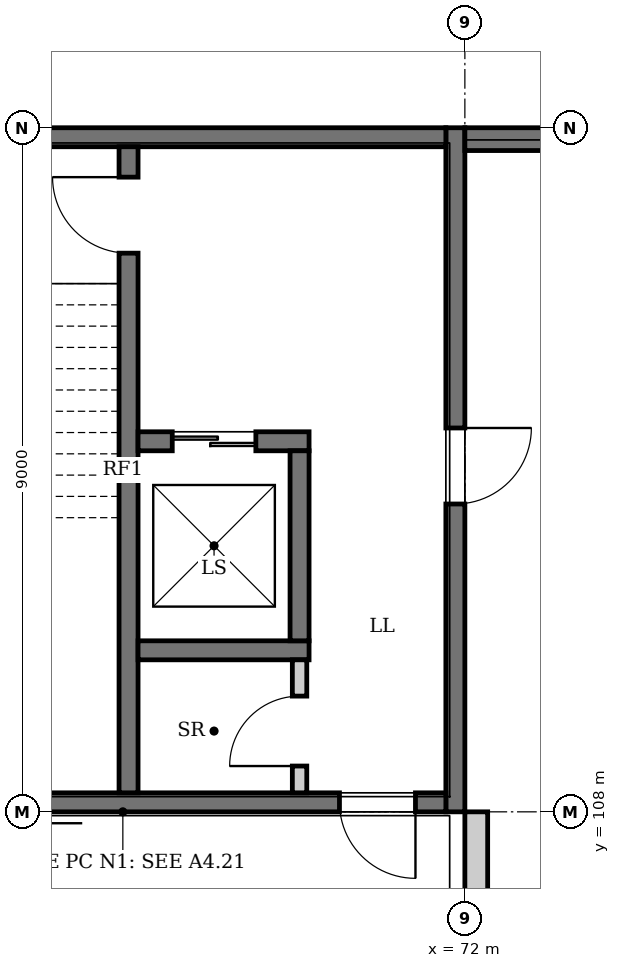
"""IFC4 building model, lengths in metres.
Left out: names, types, materials, properties, quantities, classifications, styles, units other than length and angle.
Written with IfcOpenShell. Run it as: python <this file> out.ifc"""

import sys

from ifc_helpers import new_model, si_unit, direction, frame, frame_2d, origin, place, context, subcontext, project, spatial, rectangle, extrude, element, fill, save


model = new_model("IFC4")
c1 = context("Model", 3, precision=1e-05, world=origin(), true_north=direction((0.0, 1.0)))
c2 = subcontext(c1, "Body", "Model", "MODEL_VIEW")
j1 = project(units=[si_unit("LENGTHUNIT", "METRE"), si_unit("PLANEANGLEUNIT", "RADIAN")], contexts=[c1])
p1 = place(None, origin())
s1 = spatial("IfcSite", under=j1, at=p1, CompositionType="ELEMENT")
p2 = place(p1, origin())
s2 = spatial("IfcBuilding", under=s1, at=p2, CompositionType="ELEMENT")
p3 = place(p2, frame((0.0, 0.0, 15.0)))
s3 = spatial("IfcBuildingStorey", under=s2, at=p3, CompositionType="ELEMENT", Elevation=15.0)
p4 = place(p3, frame((71.875, 108.0, 0.0), z_axis=(0.0, 0.0, 1.0), x_axis=(0.0, 1.0, 0.0)))
e1 = element("IfcWall", 1, at=p4, inside=s3, PredefinedType="SHEAR", context=c2, shape_type="SweptSolid", body=[
    extrude(rectangle(XDim=9.0, YDim=0.25, at=frame_2d((4.5, 0.0))), origin(), (0.0, 0.0, 1.0), 4.05),
])
p5 = place(p4, frame((4.05, 0.0, 0.0)))
e2 = element("IfcOpeningElement", 2, at=p5, cuts=e1, PredefinedType="OPENING", context=c2, shape_type="SweptSolid", body=[
    extrude(rectangle(XDim=1.0, YDim=2.1, at=frame_2d((0.5, 1.05))), frame((0.0, 0.135, 0.0), z_axis=(0.0, -1.0, 0.0), x_axis=(1.0, 0.0, 0.0)), (0.0, 0.0, 1.0), 0.27),
])
p6 = place(p3, frame((63.25, 108.125, 0.0), z_axis=(0.0, 0.0, 1.0), x_axis=(1.0, 0.0, 0.0)))
e3 = element("IfcWall", 3, at=p6, inside=s3, PredefinedType="SHEAR", context=c2, shape_type="SweptSolid", body=[
    extrude(rectangle(XDim=8.5, YDim=0.25, at=frame_2d((4.25, 0.0))), origin(), (0.0, 0.0, 1.0), 4.05),
])
p7 = place(p6, frame((7.1, 0.0, 0.0)))
e4 = element("IfcOpeningElement", 4, at=p7, cuts=e3, PredefinedType="OPENING", context=c2, shape_type="SweptSolid", body=[
    extrude(rectangle(XDim=1.0, YDim=2.1, at=frame_2d((0.5, 1.05))), frame((0.0, 0.135, 0.0), z_axis=(0.0, -1.0, 0.0), x_axis=(1.0, 0.0, 0.0)), (0.0, 0.0, 1.0), 0.27),
])
p8 = place(p3, frame((63.25, 116.875, 0.0), z_axis=(0.0, 0.0, 1.0), x_axis=(1.0, 0.0, 0.0)))
e5 = element("IfcWall", 5, at=p8, inside=s3, PredefinedType="SHEAR", context=c2, shape_type="SweptSolid", body=[
    extrude(rectangle(XDim=8.5, YDim=0.25, at=frame_2d((4.25, 0.0))), origin(), (0.0, 0.0, 1.0), 4.05),
])
p9 = place(p3, frame((72.0, 116.85, 0.0), z_axis=(0.0, 0.0, 1.0), x_axis=(1.0, 0.0, 0.0)))
e6 = element("IfcWall", 6, at=p9, inside=s3, PredefinedType="SOLIDWALL", context=c2, shape_type="SweptSolid", body=[
    extrude(rectangle(XDim=27.0, YDim=0.3, at=frame_2d((13.5, 0.0))), origin(), (0.0, 0.0, 1.0), 3.1),
])
p10 = place(p9, frame((1.35, 0.0, 0.9)))
e7 = element("IfcOpeningElement", 7, at=p10, cuts=e6, PredefinedType="OPENING", context=c2, shape_type="SweptSolid", body=[
    extrude(rectangle(XDim=1.8, YDim=2.1, at=frame_2d((0.9, 1.05))), frame((0.0, 0.16, 0.0), z_axis=(0.0, -1.0, 0.0), x_axis=(1.0, 0.0, 0.0)), (0.0, 0.0, 1.0), 0.32),
])
p11 = place(p9, frame((5.85, 0.0, 0.9)))
e8 = element("IfcOpeningElement", 8, at=p11, cuts=e6, PredefinedType="OPENING", context=c2, shape_type="SweptSolid", body=[
    extrude(rectangle(XDim=1.8, YDim=2.1, at=frame_2d((0.9, 1.05))), frame((0.0, 0.16, 0.0), z_axis=(0.0, -1.0, 0.0), x_axis=(1.0, 0.0, 0.0)), (0.0, 0.0, 1.0), 0.32),
])
p12 = place(p9, frame((10.35, 0.0, 0.9)))
e9 = element("IfcOpeningElement", 9, at=p12, cuts=e6, PredefinedType="OPENING", context=c2, shape_type="SweptSolid", body=[
    extrude(rectangle(XDim=1.8, YDim=2.1, at=frame_2d((0.9, 1.05))), frame((0.0, 0.16, 0.0), z_axis=(0.0, -1.0, 0.0), x_axis=(1.0, 0.0, 0.0)), (0.0, 0.0, 1.0), 0.32),
])
p13 = place(p9, frame((14.85, 0.0, 0.9)))
e10 = element("IfcOpeningElement", 10, at=p13, cuts=e6, PredefinedType="OPENING", context=c2, shape_type="SweptSolid", body=[
    extrude(rectangle(XDim=1.8, YDim=2.1, at=frame_2d((0.9, 1.05))), frame((0.0, 0.16, 0.0), z_axis=(0.0, -1.0, 0.0), x_axis=(1.0, 0.0, 0.0)), (0.0, 0.0, 1.0), 0.32),
])
p14 = place(p9, frame((19.35, 0.0, 0.9)))
e11 = element("IfcOpeningElement", 11, at=p14, cuts=e6, PredefinedType="OPENING", context=c2, shape_type="SweptSolid", body=[
    extrude(rectangle(XDim=1.8, YDim=2.1, at=frame_2d((0.9, 1.05))), frame((0.0, 0.16, 0.0), z_axis=(0.0, -1.0, 0.0), x_axis=(1.0, 0.0, 0.0)), (0.0, 0.0, 1.0), 0.32),
])
p15 = place(p9, frame((23.85, 0.0, 0.9)))
e12 = element("IfcOpeningElement", 12, at=p15, cuts=e6, PredefinedType="OPENING", context=c2, shape_type="SweptSolid", body=[
    extrude(rectangle(XDim=1.8, YDim=2.1, at=frame_2d((0.9, 1.05))), frame((0.0, 0.16, 0.0), z_axis=(0.0, -1.0, 0.0), x_axis=(1.0, 0.0, 0.0)), (0.0, 0.0, 1.0), 0.32),
])
p16 = place(p3, frame((72.15, 99.3, 0.0), z_axis=(0.0, 0.0, 1.0), x_axis=(0.0, 1.0, 0.0)))
e13 = element("IfcWall", 13, at=p16, inside=s3, PredefinedType="SOLIDWALL", context=c2, shape_type="SweptSolid", body=[
    extrude(rectangle(XDim=8.7, YDim=0.3, at=frame_2d((4.35, 0.0))), origin(), (0.0, 0.0, 1.0), 3.1),
])
p17 = place(p16, frame((3.45, 0.0, 0.9)))
e14 = element("IfcOpeningElement", 14, at=p17, cuts=e13, PredefinedType="OPENING", context=c2, shape_type="SweptSolid", body=[
    extrude(rectangle(XDim=1.8, YDim=2.1, at=frame_2d((0.9, 1.05))), frame((0.0, 0.16, 0.0), z_axis=(0.0, -1.0, 0.0), x_axis=(1.0, 0.0, 0.0)), (0.0, 0.0, 1.0), 0.32),
])
p18 = place(p3, frame((72.0, 116.92, 3.942), z_axis=(0.0, 0.0, 1.0), x_axis=(1.0, 0.0, 0.0)))
e15 = element("IfcWall", 15, at=p18, inside=s3, PredefinedType="PARAPET", context=c2, shape_type="SweptSolid", body=[
    extrude(rectangle(XDim=27.0, YDim=0.16, at=frame_2d((13.5, 0.0))), origin(), (0.0, 0.0, 1.0), 1.14),
])
p19 = place(p3, frame((67.575, 116.75, 0.0), z_axis=(0.0, 0.0, 1.0), x_axis=(0.0, -1.0, 0.0)))
e16 = element("IfcWall", 16, at=p19, inside=s3, PredefinedType="SOLIDWALL", context=c2, shape_type="SweptSolid", body=[
    extrude(rectangle(XDim=8.5, YDim=0.25, at=frame_2d((4.25, 0.0))), origin(), (0.0, 0.0, 1.0), 3.95),
])
p20 = place(p19, frame((0.4, 0.0, 0.0)))
e17 = element("IfcOpeningElement", 17, at=p20, cuts=e16, PredefinedType="OPENING", context=c2, shape_type="SweptSolid", body=[
    extrude(rectangle(XDim=1.0, YDim=2.1, at=frame_2d((0.5, 1.05))), frame((0.0, 0.135, 0.0), z_axis=(0.0, -1.0, 0.0), x_axis=(1.0, 0.0, 0.0)), (0.0, 0.0, 1.0), 0.27),
])
p21 = place(p3, frame((67.7, 110.125, 0.0), z_axis=(0.0, 0.0, 1.0), x_axis=(1.0, 0.0, 0.0)))
e18 = element("IfcWall", 18, at=p21, inside=s3, PredefinedType="SOLIDWALL", context=c2, shape_type="SweptSolid", body=[
    extrude(rectangle(XDim=2.25, YDim=0.25, at=frame_2d((1.125, 0.0))), origin(), (0.0, 0.0, 1.0), 3.9),
])
p22 = place(p3, frame((67.7, 112.875, 0.0), z_axis=(0.0, 0.0, 1.0), x_axis=(1.0, 0.0, 0.0)))
e19 = element("IfcWall", 19, at=p22, inside=s3, PredefinedType="SOLIDWALL", context=c2, shape_type="SweptSolid", body=[
    extrude(rectangle(XDim=2.25, YDim=0.25, at=frame_2d((1.125, 0.0))), origin(), (0.0, 0.0, 1.0), 3.9),
])
p23 = place(p22, frame((0.45, 0.0, 0.0)))
e20 = element("IfcOpeningElement", 20, at=p23, cuts=e19, PredefinedType="OPENING", context=c2, shape_type="SweptSolid", body=[
    extrude(rectangle(XDim=1.1, YDim=2.1, at=frame_2d((0.55, 1.05))), frame((0.0, 0.135, 0.0), z_axis=(0.0, -1.0, 0.0), x_axis=(1.0, 0.0, 0.0)), (0.0, 0.0, 1.0), 0.27),
])
p24 = place(p3, frame((69.825, 110.25, 0.0), z_axis=(0.0, 0.0, 1.0), x_axis=(0.0, 1.0, 0.0)))
e21 = element("IfcWall", 21, at=p24, inside=s3, PredefinedType="SOLIDWALL", context=c2, shape_type="SweptSolid", body=[
    extrude(rectangle(XDim=2.5, YDim=0.25, at=frame_2d((1.25, 0.0))), origin(), (0.0, 0.0, 1.0), 3.9),
])
p25 = place(p3, frame((69.825, 108.25, 0.0), z_axis=(0.0, 0.0, 1.0), x_axis=(0.0, 1.0, 0.0)))
e22 = element("IfcWall", 22, at=p25, inside=s3, PredefinedType="PARTITIONING", context=c2, shape_type="SweptSolid", body=[
    extrude(rectangle(XDim=1.75, YDim=0.19, at=frame_2d((0.875, 0.0))), origin(), (0.0, 0.0, 1.0), 3.45),
])
p26 = place(p25, frame((0.353, 0.0, 0.0)))
e23 = element("IfcOpeningElement", 23, at=p26, cuts=e22, PredefinedType="OPENING", context=c2, shape_type="SweptSolid", body=[
    extrude(rectangle(XDim=0.92, YDim=2.1, at=frame_2d((0.46, 1.05))), frame((0.0, 0.105, 0.0), z_axis=(0.0, -1.0, 0.0), x_axis=(1.0, 0.0, 0.0)), (0.0, 0.0, 1.0), 0.21),
])
p27 = place(p7, frame((1.0, 0.0, 0.0), z_axis=(0.0, 0.0, 1.0), x_axis=(-1.0, 0.0, 0.0)))
e24 = element("IfcDoor", 24, at=p27, inside=s3, OperationType="SINGLE_SWING_LEFT", PredefinedType="DOOR", context=c2, shape_type="SweptSolid", body=[
    extrude(rectangle(XDim=1.0, YDim=2.1, at=frame_2d((0.5, 1.05))), frame((0.0, 0.025, 0.0), z_axis=(0.0, -1.0, 0.0), x_axis=(1.0, 0.0, 0.0)), (0.0, 0.0, 1.0), 0.05),
])
fill(e4, e24)
p28 = place(p23, origin())
e25 = element("IfcDoor", 25, at=p28, inside=s3, OperationType="DOUBLE_DOOR_SLIDING", PredefinedType="DOOR", context=c2, shape_type="SweptSolid", body=[
    extrude(rectangle(XDim=1.1, YDim=2.1, at=frame_2d((0.55, 1.05))), frame((0.0, 0.025, 0.0), z_axis=(0.0, -1.0, 0.0), x_axis=(1.0, 0.0, 0.0)), (0.0, 0.0, 1.0), 0.05),
])
fill(e20, e25)
p29 = place(p20, frame((1.0, 0.0, 0.0), z_axis=(0.0, 0.0, 1.0), x_axis=(-1.0, 0.0, 0.0)))
e26 = element("IfcDoor", 26, at=p29, inside=s3, OperationType="SINGLE_SWING_RIGHT", PredefinedType="DOOR", context=c2, shape_type="SweptSolid", body=[
    extrude(rectangle(XDim=1.0, YDim=2.1, at=frame_2d((0.5, 1.05))), frame((0.0, 0.025, 0.0), z_axis=(0.0, -1.0, 0.0), x_axis=(1.0, 0.0, 0.0)), (0.0, 0.0, 1.0), 0.05),
])
fill(e17, e26)
p30 = place(p26, origin())
e27 = element("IfcDoor", 27, at=p30, inside=s3, OperationType="SINGLE_SWING_LEFT", PredefinedType="DOOR", context=c2, shape_type="SweptSolid", body=[
    extrude(rectangle(XDim=0.92, YDim=2.1, at=frame_2d((0.46, 1.05))), frame((0.0, 0.025, 0.0), z_axis=(0.0, -1.0, 0.0), x_axis=(1.0, 0.0, 0.0)), (0.0, 0.0, 1.0), 0.05),
])
fill(e23, e27)
p31 = place(p5, frame((1.0, 0.0, 0.0), z_axis=(0.0, 0.0, 1.0), x_axis=(-1.0, 0.0, 0.0)))
e28 = element("IfcDoor", 28, at=p31, inside=s3, OperationType="SINGLE_SWING_LEFT", PredefinedType="DOOR", context=c2, shape_type="SweptSolid", body=[
    extrude(rectangle(XDim=1.0, YDim=2.1, at=frame_2d((0.5, 1.05))), frame((0.0, 0.025, 0.0), z_axis=(0.0, -1.0, 0.0), x_axis=(1.0, 0.0, 0.0)), (0.0, 0.0, 1.0), 0.05),
])
fill(e2, e28)
save(model, sys.argv[1])
